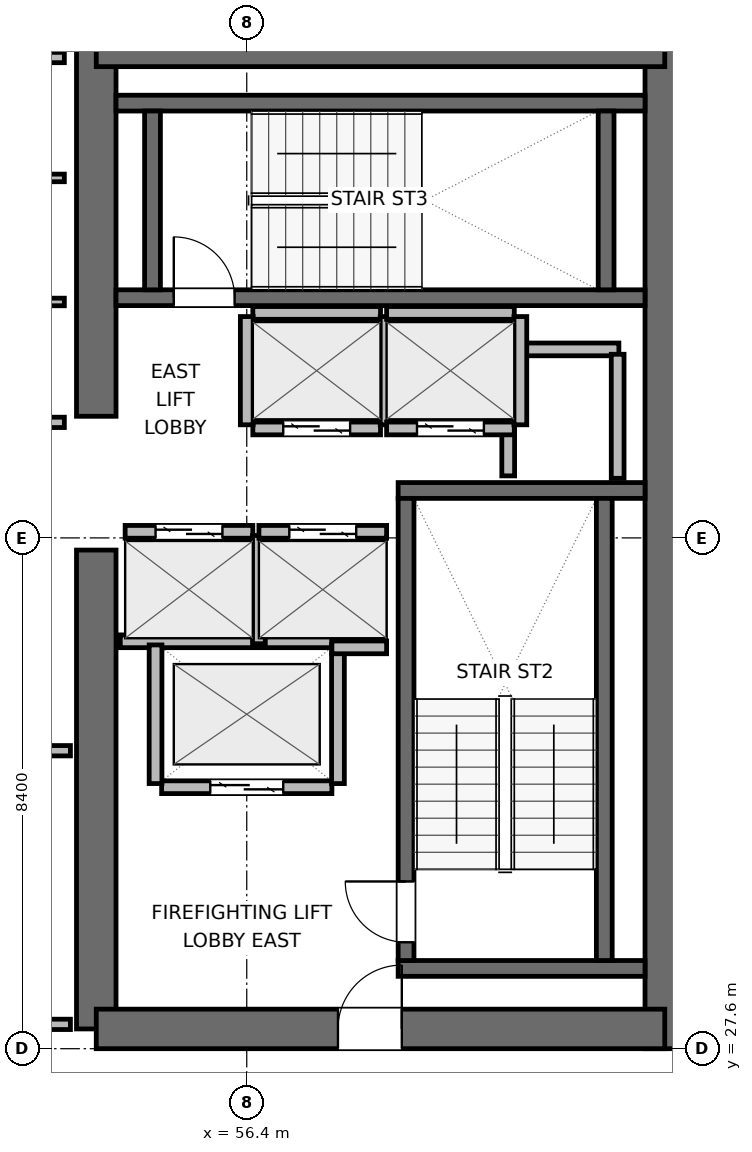
"""IFC4 building model, lengths in metres.
Left out: names, types, materials, properties, quantities, classifications, styles, units other than length and angle.
Written with IfcOpenShell. Run it as: python <this file> out.ifc"""

import sys

from ifc_helpers import new_model, si_unit, direction, frame, frame_2d, origin, place, context, subcontext, project, spatial, rectangle, extrude, element, fill, save


model = new_model("IFC4")
c1 = context("Model", 3, precision=1e-05, world=origin(), true_north=direction((0.0, 1.0)))
c2 = subcontext(c1, "Body", "Model", "MODEL_VIEW")
j1 = project(units=[si_unit("LENGTHUNIT", "METRE"), si_unit("PLANEANGLEUNIT", "RADIAN")], contexts=[c1])
p1 = place(None, origin())
s1 = spatial("IfcSite", under=j1, at=p1, CompositionType="ELEMENT")
p2 = place(p1, origin())
s2 = spatial("IfcBuilding", under=s1, at=p2, CompositionType="ELEMENT")
p3 = place(p2, frame((0.0, 0.0, 251.1)))
s3 = spatial("IfcBuildingStorey", under=s2, at=p3, CompositionType="ELEMENT", Elevation=251.1)
p4 = place(p3, frame((53.925, 27.925, 0.0), z_axis=(0.0, 0.0, 1.0), x_axis=(0.0, 1.0, 0.0)))
e1 = element("IfcWall", 1, at=p4, inside=s3, PredefinedType="SHEAR", context=c2, shape_type="SweptSolid", body=[
    extrude(rectangle(XDim=7.875, YDim=0.65, at=frame_2d((3.938, 0.0))), origin(), (0.0, 0.0, 1.0), 3.9),
])
p5 = place(p3, frame((53.925, 38.0, 0.0), z_axis=(0.0, 0.0, 1.0), x_axis=(0.0, 1.0, 0.0)))
e2 = element("IfcWall", 2, at=p5, inside=s3, PredefinedType="SHEAR", context=c2, shape_type="SweptSolid", body=[
    extrude(rectangle(XDim=6.075, YDim=0.65, at=frame_2d((3.038, 0.0))), origin(), (0.0, 0.0, 1.0), 3.9),
])
p6 = place(p3, frame((63.275, 27.6, 0.0), z_axis=(0.0, 0.0, 1.0), x_axis=(0.0, 1.0, 0.0)))
e3 = element("IfcWall", 3, at=p6, inside=s3, PredefinedType="SHEAR", context=c2, shape_type="SweptSolid", body=[
    extrude(rectangle(XDim=16.8, YDim=0.65, at=frame_2d((8.4, 0.0))), origin(), (0.0, 0.0, 1.0), 3.9),
])
p7 = place(p3, frame((53.925, 27.925, 0.0), z_axis=(0.0, 0.0, 1.0), x_axis=(1.0, 0.0, 0.0)))
e4 = element("IfcWall", 4, at=p7, inside=s3, PredefinedType="SHEAR", context=c2, shape_type="SweptSolid", body=[
    extrude(rectangle(XDim=9.35, YDim=0.65, at=frame_2d((4.675, 0.0))), origin(), (0.0, 0.0, 1.0), 3.9),
])
p8 = place(p7, frame((3.975, 0.0, 0.0)))
e5 = element("IfcOpeningElement", 5, at=p8, cuts=e4, PredefinedType="OPENING", context=c2, shape_type="SweptSolid", body=[
    extrude(rectangle(XDim=1.05, YDim=2.04, at=frame_2d((0.525, 1.02))), frame((0.0, 0.335, 0.0), z_axis=(0.0, -1.0, 0.0), x_axis=(1.0, 0.0, 0.0)), (0.0, 0.0, 1.0), 0.67),
])
p9 = place(p3, frame((53.925, 44.075, 0.0), z_axis=(0.0, 0.0, 1.0), x_axis=(1.0, 0.0, 0.0)))
e6 = element("IfcWall", 6, at=p9, inside=s3, PredefinedType="SHEAR", context=c2, shape_type="SweptSolid", body=[
    extrude(rectangle(XDim=9.35, YDim=0.65, at=frame_2d((4.675, 0.0))), origin(), (0.0, 0.0, 1.0), 3.9),
])
for number, where, z_axis, x_axis in (
    (7, (58.89, 28.92, 0.0), (0.0, 0.0, 1.0), (1.0, 0.0, 0.0)),
    (8, (58.89, 36.78, 0.0), (0.0, 0.0, 1.0), (1.0, 0.0, 0.0)),
):
    element("IfcWall", number, at=place(p3, frame(where, z_axis=z_axis, x_axis=x_axis)), inside=s3, PredefinedType="SHEAR", context=c2, shape_type="SweptSolid", body=[
        extrude(rectangle(XDim=4.06, YDim=0.26, at=frame_2d((2.03, 0.0))), origin(), (0.0, 0.0, 1.0), 3.9),
    ])
p10 = place(p3, frame((59.02, 29.05, 0.0), z_axis=(0.0, 0.0, 1.0), x_axis=(0.0, 1.0, 0.0)))
e9 = element("IfcWall", 9, at=p10, inside=s3, PredefinedType="SHEAR", context=c2, shape_type="SweptSolid", body=[
    extrude(rectangle(XDim=7.6, YDim=0.26, at=frame_2d((3.8, 0.0))), origin(), (0.0, 0.0, 1.0), 3.9),
])
p11 = place(p10, frame((0.3, 0.0, 0.0)))
e10 = element("IfcOpeningElement", 10, at=p11, cuts=e9, PredefinedType="OPENING", context=c2, shape_type="SweptSolid", body=[
    extrude(rectangle(XDim=1.0, YDim=2.04, at=frame_2d((0.5, 1.02))), frame((0.0, 0.14, 0.0), z_axis=(0.0, -1.0, 0.0), x_axis=(1.0, 0.0, 0.0)), (0.0, 0.0, 1.0), 0.28),
])
p12 = place(p3, frame((62.28, 29.05, 0.0), z_axis=(0.0, 0.0, 1.0), x_axis=(0.0, 1.0, 0.0)))
e11 = element("IfcWall", 11, at=p12, inside=s3, PredefinedType="SHEAR", context=c2, shape_type="SweptSolid", body=[
    extrude(rectangle(XDim=7.6, YDim=0.26, at=frame_2d((3.8, 0.0))), origin(), (0.0, 0.0, 1.0), 3.9),
])
p13 = place(p3, frame((54.25, 39.95, 0.0), z_axis=(0.0, 0.0, 1.0), x_axis=(1.0, 0.0, 0.0)))
e12 = element("IfcWall", 12, at=p13, inside=s3, PredefinedType="SHEAR", context=c2, shape_type="SweptSolid", body=[
    extrude(rectangle(XDim=8.7, YDim=0.26, at=frame_2d((4.35, 0.0))), origin(), (0.0, 0.0, 1.0), 3.9),
])
p14 = place(p13, frame((0.95, 0.0, 0.0)))
e13 = element("IfcOpeningElement", 13, at=p14, cuts=e12, PredefinedType="OPENING", context=c2, shape_type="SweptSolid", body=[
    extrude(rectangle(XDim=1.0, YDim=2.04, at=frame_2d((0.5, 1.02))), frame((0.0, 0.14, 0.0), z_axis=(0.0, -1.0, 0.0), x_axis=(1.0, 0.0, 0.0)), (0.0, 0.0, 1.0), 0.28),
])
p15 = place(p3, frame((54.25, 43.15, 0.0), z_axis=(0.0, 0.0, 1.0), x_axis=(1.0, 0.0, 0.0)))
e14 = element("IfcWall", 14, at=p15, inside=s3, PredefinedType="SHEAR", context=c2, shape_type="SweptSolid", body=[
    extrude(rectangle(XDim=8.7, YDim=0.26, at=frame_2d((4.35, 0.0))), origin(), (0.0, 0.0, 1.0), 3.9),
])
for number, where, z_axis, x_axis in (
    (15, (54.85, 40.08, 0.0), (0.0, 0.0, 1.0), (0.0, 1.0, 0.0)),
    (16, (62.31, 40.08, 0.0), (0.0, 0.0, 1.0), (0.0, 1.0, 0.0)),
):
    element("IfcWall", number, at=place(p3, frame(where, z_axis=z_axis, x_axis=x_axis)), inside=s3, PredefinedType="SHEAR", context=c2, shape_type="SweptSolid", body=[
        extrude(rectangle(XDim=2.94, YDim=0.26, at=frame_2d((1.47, 0.0))), origin(), (0.0, 0.0, 1.0), 3.9),
    ])
p16 = place(p3, frame((60.72, 39.1, 0.0), z_axis=(0.0, 0.0, 1.0), x_axis=(1.0, 0.0, 0.0)))
e17 = element("IfcWall", 17, at=p16, inside=s3, PredefinedType="PARTITIONING", context=c2, shape_type="SweptSolid", body=[
    extrude(rectangle(XDim=1.8, YDim=0.21, at=frame_2d((0.9, 0.0))), origin(), (0.0, 0.0, 1.0), 3.68),
])
p17 = place(p3, frame((60.7, 37.02, 0.0), z_axis=(0.0, 0.0, 1.0), x_axis=(0.0, 1.0, 0.0)))
e18 = element("IfcWall", 18, at=p17, inside=s3, PredefinedType="PARTITIONING", context=c2, shape_type="SweptSolid", body=[
    extrude(rectangle(XDim=1.96, YDim=0.21, at=frame_2d((0.98, 0.0))), origin(), (0.0, 0.0, 1.0), 3.68),
])
p18 = place(p3, frame((62.5, 36.98, 0.0), z_axis=(0.0, 0.0, 1.0), x_axis=(0.0, 1.0, 0.0)))
e19 = element("IfcWall", 19, at=p18, inside=s3, PredefinedType="PARTITIONING", context=c2, shape_type="SweptSolid", body=[
    extrude(rectangle(XDim=2.04, YDim=0.21, at=frame_2d((1.02, 0.0))), origin(), (0.0, 0.0, 1.0), 3.68),
])
p19 = place(p3, frame((55.0, 31.9, 0.0), z_axis=(0.0, 0.0, 1.0), x_axis=(1.0, 0.0, 0.0)))
e20 = element("IfcWall", 20, at=p19, inside=s3, PredefinedType="PARTITIONING", context=c2, shape_type="SweptSolid", body=[
    extrude(rectangle(XDim=2.8, YDim=0.21, at=frame_2d((1.4, 0.0))), origin(), (0.0, 0.0, 1.0), 3.68),
])
p20 = place(p19, frame((0.8, 0.0, 0.0)))
e21 = element("IfcOpeningElement", 21, at=p20, cuts=e20, PredefinedType="OPENING", context=c2, shape_type="SweptSolid", body=[
    extrude(rectangle(XDim=1.2, YDim=2.04, at=frame_2d((0.6, 1.02))), frame((0.0, 0.115, 0.0), z_axis=(0.0, -1.0, 0.0), x_axis=(1.0, 0.0, 0.0)), (0.0, 0.0, 1.0), 0.23),
])
p21 = place(p3, frame((54.32, 34.3, 0.0), z_axis=(0.0, 0.0, 1.0), x_axis=(1.0, 0.0, 0.0)))
e22 = element("IfcWall", 22, at=p21, inside=s3, PredefinedType="PARTITIONING", context=c2, shape_type="SweptSolid", body=[
    extrude(rectangle(XDim=3.48, YDim=0.21, at=frame_2d((1.74, 0.0))), origin(), (0.0, 0.0, 1.0), 3.68),
])
for number, where, z_axis, x_axis in (
    (23, (54.9, 31.96, 0.0), (0.0, 0.0, 1.0), (0.0, 1.0, 0.0)),
    (24, (57.9, 31.96, 0.0), (0.0, 0.0, 1.0), (0.0, 1.0, 0.0)),
):
    element("IfcWall", number, at=place(p3, frame(where, z_axis=z_axis, x_axis=x_axis)), inside=s3, PredefinedType="PARTITIONING", context=c2, shape_type="SweptSolid", body=[
        extrude(rectangle(XDim=2.28, YDim=0.21, at=frame_2d((1.14, 0.0))), origin(), (0.0, 0.0, 1.0), 3.68),
    ])
p22 = place(p3, frame((54.4, 36.1, 0.0), z_axis=(0.0, 0.0, 1.0), x_axis=(1.0, 0.0, 0.0)))
e25 = element("IfcWall", 25, at=p22, inside=s3, PredefinedType="PARTITIONING", context=c2, shape_type="SweptSolid", body=[
    extrude(rectangle(XDim=2.1, YDim=0.21, at=frame_2d((1.05, 0.0))), origin(), (0.0, 0.0, 1.0), 3.68),
])
p23 = place(p22, frame((0.5, 0.0, 0.0)))
e26 = element("IfcOpeningElement", 26, at=p23, cuts=e25, PredefinedType="OPENING", context=c2, shape_type="SweptSolid", body=[
    extrude(rectangle(XDim=1.1, YDim=2.04, at=frame_2d((0.55, 1.02))), frame((0.0, 0.115, 0.0), z_axis=(0.0, -1.0, 0.0), x_axis=(1.0, 0.0, 0.0)), (0.0, 0.0, 1.0), 0.23),
])
p24 = place(p3, frame((56.6, 34.26, 0.0), z_axis=(0.0, 0.0, 1.0), x_axis=(0.0, 1.0, 0.0)))
e27 = element("IfcWall", 27, at=p24, inside=s3, PredefinedType="PARTITIONING", context=c2, shape_type="SweptSolid", body=[
    extrude(rectangle(XDim=1.78, YDim=0.21, at=frame_2d((0.89, 0.0))), origin(), (0.0, 0.0, 1.0), 3.68),
])
p25 = place(p3, frame((56.6, 36.1, 0.0), z_axis=(0.0, 0.0, 1.0), x_axis=(1.0, 0.0, 0.0)))
e28 = element("IfcWall", 28, at=p25, inside=s3, PredefinedType="PARTITIONING", context=c2, shape_type="SweptSolid", body=[
    extrude(rectangle(XDim=2.1, YDim=0.21, at=frame_2d((1.05, 0.0))), origin(), (0.0, 0.0, 1.0), 3.68),
])
p26 = place(p25, frame((0.5, 0.0, 0.0)))
e29 = element("IfcOpeningElement", 29, at=p26, cuts=e28, PredefinedType="OPENING", context=c2, shape_type="SweptSolid", body=[
    extrude(rectangle(XDim=1.1, YDim=2.04, at=frame_2d((0.55, 1.02))), frame((0.0, 0.115, 0.0), z_axis=(0.0, -1.0, 0.0), x_axis=(1.0, 0.0, 0.0)), (0.0, 0.0, 1.0), 0.23),
])
p27 = place(p3, frame((57.8, 34.2, 0.0), z_axis=(0.0, 0.0, 1.0), x_axis=(1.0, 0.0, 0.0)))
e30 = element("IfcWall", 30, at=p27, inside=s3, PredefinedType="PARTITIONING", context=c2, shape_type="SweptSolid", body=[
    extrude(rectangle(XDim=0.9, YDim=0.21, at=frame_2d((0.45, 0.0))), origin(), (0.0, 0.0, 1.0), 3.68),
])
p28 = place(p3, frame((56.5, 37.8, 0.0), z_axis=(0.0, 0.0, 1.0), x_axis=(1.0, 0.0, 0.0)))
e31 = element("IfcWall", 31, at=p28, inside=s3, PredefinedType="PARTITIONING", context=c2, shape_type="SweptSolid", body=[
    extrude(rectangle(XDim=2.1, YDim=0.21, at=frame_2d((1.05, 0.0))), origin(), (0.0, 0.0, 1.0), 3.68),
])
p29 = place(p28, frame((0.5, 0.0, 0.0)))
e32 = element("IfcOpeningElement", 32, at=p29, cuts=e31, PredefinedType="OPENING", context=c2, shape_type="SweptSolid", body=[
    extrude(rectangle(XDim=1.1, YDim=2.04, at=frame_2d((0.55, 1.02))), frame((0.0, 0.115, 0.0), z_axis=(0.0, -1.0, 0.0), x_axis=(1.0, 0.0, 0.0)), (0.0, 0.0, 1.0), 0.23),
])
p30 = place(p3, frame((56.5, 39.7, 0.0), z_axis=(0.0, 0.0, 1.0), x_axis=(1.0, 0.0, 0.0)))
e33 = element("IfcWall", 33, at=p30, inside=s3, PredefinedType="PARTITIONING", context=c2, shape_type="SweptSolid", body=[
    extrude(rectangle(XDim=2.1, YDim=0.21, at=frame_2d((1.05, 0.0))), origin(), (0.0, 0.0, 1.0), 3.68),
])
for number, where, z_axis, x_axis in (
    (34, (56.4, 37.86, 0.0), (0.0, 0.0, 1.0), (0.0, 1.0, 0.0)),
    (35, (58.7, 37.86, 0.0), (0.0, 0.0, 1.0), (0.0, 1.0, 0.0)),
):
    element("IfcWall", number, at=place(p3, frame(where, z_axis=z_axis, x_axis=x_axis)), inside=s3, PredefinedType="PARTITIONING", context=c2, shape_type="SweptSolid", body=[
        extrude(rectangle(XDim=1.78, YDim=0.21, at=frame_2d((0.89, 0.0))), origin(), (0.0, 0.0, 1.0), 3.68),
    ])
p31 = place(p3, frame((58.7, 37.8, 0.0), z_axis=(0.0, 0.0, 1.0), x_axis=(1.0, 0.0, 0.0)))
e36 = element("IfcWall", 36, at=p31, inside=s3, PredefinedType="PARTITIONING", context=c2, shape_type="SweptSolid", body=[
    extrude(rectangle(XDim=2.1, YDim=0.21, at=frame_2d((1.05, 0.0))), origin(), (0.0, 0.0, 1.0), 3.68),
])
p32 = place(p31, frame((0.5, 0.0, 0.0)))
e37 = element("IfcOpeningElement", 37, at=p32, cuts=e36, PredefinedType="OPENING", context=c2, shape_type="SweptSolid", body=[
    extrude(rectangle(XDim=1.1, YDim=2.04, at=frame_2d((0.55, 1.02))), frame((0.0, 0.115, 0.0), z_axis=(0.0, -1.0, 0.0), x_axis=(1.0, 0.0, 0.0)), (0.0, 0.0, 1.0), 0.23),
])
p33 = place(p3, frame((58.7, 39.7, 0.0), z_axis=(0.0, 0.0, 1.0), x_axis=(1.0, 0.0, 0.0)))
e38 = element("IfcWall", 38, at=p33, inside=s3, PredefinedType="PARTITIONING", context=c2, shape_type="SweptSolid", body=[
    extrude(rectangle(XDim=2.1, YDim=0.21, at=frame_2d((1.05, 0.0))), origin(), (0.0, 0.0, 1.0), 3.68),
])
p34 = place(p3, frame((60.9, 37.86, 0.0), z_axis=(0.0, 0.0, 1.0), x_axis=(0.0, 1.0, 0.0)))
e39 = element("IfcWall", 39, at=p34, inside=s3, PredefinedType="PARTITIONING", context=c2, shape_type="SweptSolid", body=[
    extrude(rectangle(XDim=1.78, YDim=0.21, at=frame_2d((0.89, 0.0))), origin(), (0.0, 0.0, 1.0), 3.68),
])
p35 = place(p3, frame((49.287, 28.0, 0.0), z_axis=(0.0, 0.0, 1.0), x_axis=(1.0, 0.0, 0.0)))
e40 = element("IfcWall", 40, at=p35, inside=s3, PredefinedType="PARTITIONING", context=c2, shape_type="SweptSolid", body=[
    extrude(rectangle(XDim=4.213, YDim=0.17, at=frame_2d((2.106, 0.0))), origin(), (0.0, 0.0, 1.0), 2.765),
])
p36 = place(p3, frame((52.2, 32.5, 0.0), z_axis=(0.0, 0.0, 1.0), x_axis=(1.0, 0.0, 0.0)))
e41 = element("IfcWall", 41, at=p36, inside=s3, PredefinedType="PARTITIONING", context=c2, shape_type="SweptSolid", body=[
    extrude(rectangle(XDim=1.3, YDim=0.17, at=frame_2d((0.65, 0.0))), origin(), (0.0, 0.0, 1.0), 3.68),
])
p37 = place(p3, frame((49.287, 37.9, 0.0), z_axis=(0.0, 0.0, 1.0), x_axis=(1.0, 0.0, 0.0)))
e42 = element("IfcWall", 42, at=p37, inside=s3, PredefinedType="PARTITIONING", context=c2, shape_type="SweptSolid", body=[
    extrude(rectangle(XDim=4.113, YDim=0.17, at=frame_2d((2.056, 0.0))), origin(), (0.0, 0.0, 1.0), 3.68),
])
p38 = place(p3, frame((49.287, 43.9, 0.0), z_axis=(0.0, 0.0, 1.0), x_axis=(1.0, 0.0, 0.0)))
e43 = element("IfcWall", 43, at=p38, inside=s3, PredefinedType="PARTITIONING", context=c2, shape_type="SweptSolid", body=[
    extrude(rectangle(XDim=4.113, YDim=0.17, at=frame_2d((2.056, 0.0))), origin(), (0.0, 0.0, 1.0), 2.765),
])
for number, where, z_axis, x_axis in (
    (44, (49.287, 39.88, 0.0), (0.0, 0.0, 1.0), (1.0, 0.0, 0.0)),
    (45, (49.287, 41.92, 0.0), (0.0, 0.0, 1.0), (1.0, 0.0, 0.0)),
):
    element("IfcWall", number, at=place(p3, frame(where, z_axis=z_axis, x_axis=x_axis)), inside=s3, PredefinedType="PARTITIONING", context=c2, shape_type="SweptSolid", body=[
        extrude(rectangle(XDim=4.113, YDim=0.125, at=frame_2d((2.056, 0.0))), origin(), (0.0, 0.0, 1.0), 3.68),
    ])
p39 = place(p11, origin())
e46 = element("IfcDoor", 46, at=p39, inside=s3, OperationType="SINGLE_SWING_RIGHT", PredefinedType="DOOR", context=c2, shape_type="SweptSolid", body=[
    extrude(rectangle(XDim=1.0, YDim=2.04, at=frame_2d((0.5, 1.02))), frame((0.0, 0.025, 0.0), z_axis=(0.0, -1.0, 0.0), x_axis=(1.0, 0.0, 0.0)), (0.0, 0.0, 1.0), 0.05),
])
fill(e10, e46)
p40 = place(p14, origin())
e47 = element("IfcDoor", 47, at=p40, inside=s3, OperationType="SINGLE_SWING_LEFT", PredefinedType="DOOR", context=c2, shape_type="SweptSolid", body=[
    extrude(rectangle(XDim=1.0, YDim=2.04, at=frame_2d((0.5, 1.02))), frame((0.0, 0.025, 0.0), z_axis=(0.0, -1.0, 0.0), x_axis=(1.0, 0.0, 0.0)), (0.0, 0.0, 1.0), 0.05),
])
fill(e13, e47)
p41 = place(p20, origin())
e48 = element("IfcDoor", 48, at=p41, inside=s3, OperationType="DOUBLE_DOOR_SLIDING", PredefinedType="DOOR", context=c2, shape_type="SweptSolid", body=[
    extrude(rectangle(XDim=1.2, YDim=2.04, at=frame_2d((0.6, 1.02))), frame((0.0, 0.025, 0.0), z_axis=(0.0, -1.0, 0.0), x_axis=(1.0, 0.0, 0.0)), (0.0, 0.0, 1.0), 0.05),
])
fill(e21, e48)
p42 = place(p23, origin())
e49 = element("IfcDoor", 49, at=p42, inside=s3, OperationType="DOUBLE_DOOR_SLIDING", PredefinedType="DOOR", context=c2, shape_type="SweptSolid", body=[
    extrude(rectangle(XDim=1.1, YDim=2.04, at=frame_2d((0.55, 1.02))), frame((0.0, 0.025, 0.0), z_axis=(0.0, -1.0, 0.0), x_axis=(1.0, 0.0, 0.0)), (0.0, 0.0, 1.0), 0.05),
])
fill(e26, e49)
p43 = place(p26, origin())
e50 = element("IfcDoor", 50, at=p43, inside=s3, OperationType="DOUBLE_DOOR_SLIDING", PredefinedType="DOOR", context=c2, shape_type="SweptSolid", body=[
    extrude(rectangle(XDim=1.1, YDim=2.04, at=frame_2d((0.55, 1.02))), frame((0.0, 0.025, 0.0), z_axis=(0.0, -1.0, 0.0), x_axis=(1.0, 0.0, 0.0)), (0.0, 0.0, 1.0), 0.05),
])
fill(e29, e50)
p44 = place(p29, origin())
e51 = element("IfcDoor", 51, at=p44, inside=s3, OperationType="DOUBLE_DOOR_SLIDING", PredefinedType="DOOR", context=c2, shape_type="SweptSolid", body=[
    extrude(rectangle(XDim=1.1, YDim=2.04, at=frame_2d((0.55, 1.02))), frame((0.0, 0.025, 0.0), z_axis=(0.0, -1.0, 0.0), x_axis=(1.0, 0.0, 0.0)), (0.0, 0.0, 1.0), 0.05),
])
fill(e32, e51)
p45 = place(p32, origin())
e52 = element("IfcDoor", 52, at=p45, inside=s3, OperationType="DOUBLE_DOOR_SLIDING", PredefinedType="DOOR", context=c2, shape_type="SweptSolid", body=[
    extrude(rectangle(XDim=1.1, YDim=2.04, at=frame_2d((0.55, 1.02))), frame((0.0, 0.025, 0.0), z_axis=(0.0, -1.0, 0.0), x_axis=(1.0, 0.0, 0.0)), (0.0, 0.0, 1.0), 0.05),
])
fill(e37, e52)
p46 = place(p8, origin())
e53 = element("IfcDoor", 53, at=p46, inside=s3, OperationType="SINGLE_SWING_RIGHT", PredefinedType="DOOR", context=c2, shape_type="SweptSolid", body=[
    extrude(rectangle(XDim=1.05, YDim=2.04, at=frame_2d((0.525, 1.02))), frame((0.0, 0.025, 0.0), z_axis=(0.0, -1.0, 0.0), x_axis=(1.0, 0.0, 0.0)), (0.0, 0.0, 1.0), 0.05),
])
fill(e5, e53)
save(model, sys.argv[1])
